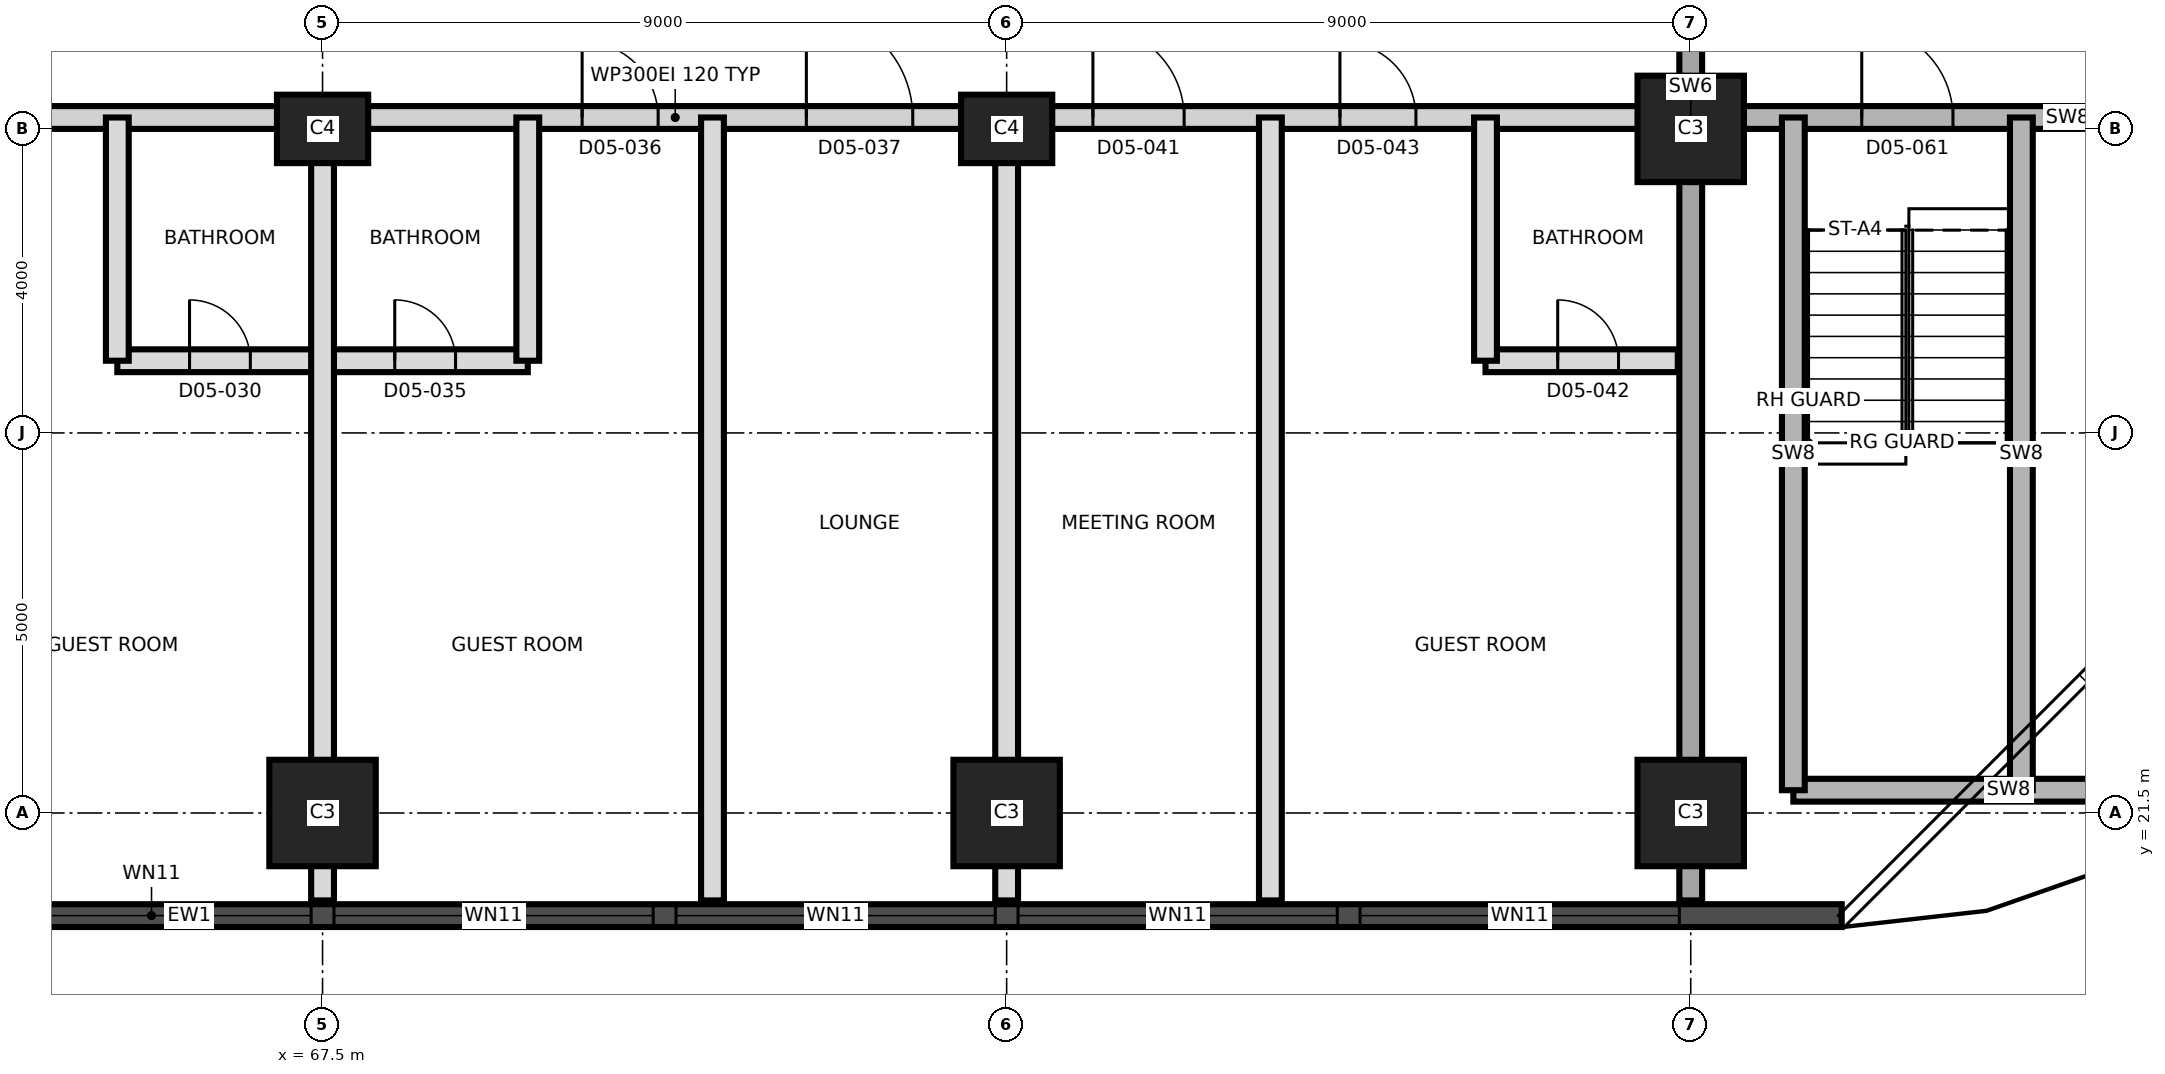
"""IFC4 building model, lengths in metres.
Left out: names, types, materials, properties, quantities, classifications, styles, units other than length and angle.
Written with IfcOpenShell. Run it as: python <this file> out.ifc"""

import sys

from ifc_helpers import new_model, si_unit, direction, frame, frame_2d, origin, origin_2d, place, context, subcontext, project, spatial, rectangle, extrude, element, fill, save


model = new_model("IFC4")
c1 = context("Model", 3, precision=1e-05, world=origin(), true_north=direction((0.0, 1.0)))
c2 = subcontext(c1, "Body", "Model", "MODEL_VIEW")
j1 = project(units=[si_unit("LENGTHUNIT", "METRE"), si_unit("PLANEANGLEUNIT", "RADIAN")], contexts=[c1])
p1 = place(None, origin())
s1 = spatial("IfcSite", under=j1, at=p1, CompositionType="ELEMENT")
p2 = place(p1, origin())
s2 = spatial("IfcBuilding", under=s1, at=p2, CompositionType="ELEMENT")
p3 = place(p2, frame((0.0, 0.0, 77.9)))
s3 = spatial("IfcBuildingStorey", under=s2, at=p3, CompositionType="ELEMENT", Elevation=77.9)
for number, where, z_axis, x_axis in (
    (1, (67.5, 21.5, 0.0), (0.0, 0.0, 1.0), (1.0, 0.0, 0.0)),
    (2, (76.5, 21.5, 0.0), (0.0, 0.0, 1.0), (1.0, 0.0, 0.0)),
    (3, (85.5, 21.5, 0.0), (0.0, 0.0, 1.0), (1.0, 0.0, 0.0)),
):
    element("IfcColumn", number, at=place(p3, frame(where, z_axis=z_axis, x_axis=x_axis)), inside=s3, PredefinedType="COLUMN", context=c2, shape_type="SweptSolid", body=[
        extrude(rectangle(XDim=1.4, YDim=1.4, at=origin_2d()), origin(), (0.0, 0.0, 1.0), 3.7),
    ])
for number, where, z_axis, x_axis in (
    (4, (67.5, 30.5, 0.0), (0.0, 0.0, 1.0), (1.0, 0.0, 0.0)),
    (5, (76.5, 30.5, 0.0), (0.0, 0.0, 1.0), (1.0, 0.0, 0.0)),
):
    element("IfcColumn", number, at=place(p3, frame(where, z_axis=z_axis, x_axis=x_axis)), inside=s3, PredefinedType="COLUMN", context=c2, shape_type="SweptSolid", body=[
        extrude(rectangle(XDim=1.2, YDim=0.9, at=origin_2d()), origin(), (0.0, 0.0, 1.0), 3.7),
    ])
p4 = place(p3, frame((85.5, 30.5, 0.0), z_axis=(0.0, 0.0, 1.0), x_axis=(1.0, 0.0, 0.0)))
e6 = element("IfcColumn", 6, at=p4, inside=s3, PredefinedType="COLUMN", context=c2, shape_type="SweptSolid", body=[
    extrude(rectangle(XDim=1.4, YDim=1.4, at=origin_2d()), origin(), (0.0, 0.0, 1.0), 3.7),
])
p5 = place(p3, frame((85.5, 20.35, 0.0), z_axis=(0.0, 0.0, 1.0), x_axis=(0.0, 1.0, 0.0)))
e7 = element("IfcWall", 7, at=p5, inside=s3, PredefinedType="SHEAR", context=c2, shape_type="SweptSolid", body=[
    extrude(rectangle(XDim=20.3, YDim=0.3, at=frame_2d((10.15, 0.0))), origin(), (0.0, 0.0, 1.0), 3.7),
])
p6 = place(p5, frame((11.35, 0.0, 0.0)))
e8 = element("IfcOpeningElement", 8, at=p6, cuts=e7, PredefinedType="OPENING", context=c2, shape_type="SweptSolid", body=[
    extrude(rectangle(XDim=1.4, YDim=2.1, at=frame_2d((0.7, 1.05))), frame((0.0, 0.16, 0.0), z_axis=(0.0, -1.0, 0.0), x_axis=(1.0, 0.0, 0.0)), (0.0, 0.0, 1.0), 0.32),
])
p7 = place(p3, frame((44.011, 20.15, 0.0), z_axis=(0.0, 0.0, 1.0), x_axis=(1.0, 0.0, 0.0)))
e9 = element("IfcWall", 9, at=p7, inside=s3, PredefinedType="SOLIDWALL", context=c2, shape_type="SweptSolid", body=[
    extrude(rectangle(XDim=43.476, YDim=0.3, at=frame_2d((21.738, 0.0))), origin(), (0.0, 0.0, 1.0), 3.4),
])
p8 = place(p7, frame((1.845, 0.0, 0.3)))
e10 = element("IfcOpeningElement", 10, at=p8, cuts=e9, PredefinedType="OPENING", context=c2, shape_type="SweptSolid", body=[
    extrude(rectangle(XDim=1.8, YDim=2.4, at=frame_2d((0.9, 1.2))), frame((0.0, 0.16, 0.0), z_axis=(0.0, -1.0, 0.0), x_axis=(1.0, 0.0, 0.0)), (0.0, 0.0, 1.0), 0.32),
])
p9 = place(p7, frame((5.639, 0.0, 0.9)))
e11 = element("IfcOpeningElement", 11, at=p9, cuts=e9, PredefinedType="OPENING", context=c2, shape_type="SweptSolid", body=[
    extrude(rectangle(XDim=4.2, YDim=1.5, at=frame_2d((2.1, 0.75))), frame((0.0, 0.16, 0.0), z_axis=(0.0, -1.0, 0.0), x_axis=(1.0, 0.0, 0.0)), (0.0, 0.0, 1.0), 0.32),
])
p10 = place(p7, frame((10.139, 0.0, 0.9)))
e12 = element("IfcOpeningElement", 12, at=p10, cuts=e9, PredefinedType="OPENING", context=c2, shape_type="SweptSolid", body=[
    extrude(rectangle(XDim=4.2, YDim=1.5, at=frame_2d((2.1, 0.75))), frame((0.0, 0.16, 0.0), z_axis=(0.0, -1.0, 0.0), x_axis=(1.0, 0.0, 0.0)), (0.0, 0.0, 1.0), 0.32),
])
p11 = place(p7, frame((14.639, 0.0, 0.9)))
e13 = element("IfcOpeningElement", 13, at=p11, cuts=e9, PredefinedType="OPENING", context=c2, shape_type="SweptSolid", body=[
    extrude(rectangle(XDim=4.2, YDim=1.5, at=frame_2d((2.1, 0.75))), frame((0.0, 0.16, 0.0), z_axis=(0.0, -1.0, 0.0), x_axis=(1.0, 0.0, 0.0)), (0.0, 0.0, 1.0), 0.32),
])
p12 = place(p7, frame((19.139, 0.0, 0.9)))
e14 = element("IfcOpeningElement", 14, at=p12, cuts=e9, PredefinedType="OPENING", context=c2, shape_type="SweptSolid", body=[
    extrude(rectangle(XDim=4.2, YDim=1.5, at=frame_2d((2.1, 0.75))), frame((0.0, 0.16, 0.0), z_axis=(0.0, -1.0, 0.0), x_axis=(1.0, 0.0, 0.0)), (0.0, 0.0, 1.0), 0.32),
])
p13 = place(p7, frame((23.639, 0.0, 0.9)))
e15 = element("IfcOpeningElement", 15, at=p13, cuts=e9, PredefinedType="OPENING", context=c2, shape_type="SweptSolid", body=[
    extrude(rectangle(XDim=4.2, YDim=1.5, at=frame_2d((2.1, 0.75))), frame((0.0, 0.16, 0.0), z_axis=(0.0, -1.0, 0.0), x_axis=(1.0, 0.0, 0.0)), (0.0, 0.0, 1.0), 0.32),
])
p14 = place(p7, frame((28.139, 0.0, 0.9)))
e16 = element("IfcOpeningElement", 16, at=p14, cuts=e9, PredefinedType="OPENING", context=c2, shape_type="SweptSolid", body=[
    extrude(rectangle(XDim=4.2, YDim=1.5, at=frame_2d((2.1, 0.75))), frame((0.0, 0.16, 0.0), z_axis=(0.0, -1.0, 0.0), x_axis=(1.0, 0.0, 0.0)), (0.0, 0.0, 1.0), 0.32),
])
p15 = place(p7, frame((32.639, 0.0, 0.9)))
e17 = element("IfcOpeningElement", 17, at=p15, cuts=e9, PredefinedType="OPENING", context=c2, shape_type="SweptSolid", body=[
    extrude(rectangle(XDim=4.2, YDim=1.5, at=frame_2d((2.1, 0.75))), frame((0.0, 0.16, 0.0), z_axis=(0.0, -1.0, 0.0), x_axis=(1.0, 0.0, 0.0)), (0.0, 0.0, 1.0), 0.32),
])
p16 = place(p7, frame((37.139, 0.0, 0.9)))
e18 = element("IfcOpeningElement", 18, at=p16, cuts=e9, PredefinedType="OPENING", context=c2, shape_type="SweptSolid", body=[
    extrude(rectangle(XDim=4.2, YDim=1.5, at=frame_2d((2.1, 0.75))), frame((0.0, 0.16, 0.0), z_axis=(0.0, -1.0, 0.0), x_axis=(1.0, 0.0, 0.0)), (0.0, 0.0, 1.0), 0.32),
])
p17 = place(p3, frame((86.85, 21.8, 0.0), z_axis=(0.0, 0.0, 1.0), x_axis=(1.0, 0.0, 0.0)))
e19 = element("IfcWall", 19, at=p17, inside=s3, PredefinedType="SHEAR", context=c2, shape_type="SweptSolid", body=[
    extrude(rectangle(XDim=5.665, YDim=0.3, at=frame_2d((2.833, 0.0))), origin(), (0.0, 0.0, 1.0), 3.4),
])
p18 = place(p3, frame((64.8, 27.45, 0.0), z_axis=(0.0, 0.0, 1.0), x_axis=(1.0, 0.0, 0.0)))
e20 = element("IfcWall", 20, at=p18, inside=s3, PredefinedType="PARTITIONING", context=c2, shape_type="SweptSolid", body=[
    extrude(rectangle(XDim=5.4, YDim=0.3, at=frame_2d((2.7, 0.0))), origin(), (0.0, 0.0, 1.0), 3.4),
])
p19 = place(p18, frame((0.95, 0.0, 0.0)))
e21 = element("IfcOpeningElement", 21, at=p19, cuts=e20, PredefinedType="OPENING", context=c2, shape_type="SweptSolid", body=[
    extrude(rectangle(XDim=0.8, YDim=2.1, at=frame_2d((0.4, 1.05))), frame((0.0, 0.16, 0.0), z_axis=(0.0, -1.0, 0.0), x_axis=(1.0, 0.0, 0.0)), (0.0, 0.0, 1.0), 0.32),
])
p20 = place(p18, frame((3.65, 0.0, 0.0)))
e22 = element("IfcOpeningElement", 22, at=p20, cuts=e20, PredefinedType="OPENING", context=c2, shape_type="SweptSolid", body=[
    extrude(rectangle(XDim=0.8, YDim=2.1, at=frame_2d((0.4, 1.05))), frame((0.0, 0.16, 0.0), z_axis=(0.0, -1.0, 0.0), x_axis=(1.0, 0.0, 0.0)), (0.0, 0.0, 1.0), 0.32),
])
p21 = place(p3, frame((82.8, 27.45, 0.0), z_axis=(0.0, 0.0, 1.0), x_axis=(1.0, 0.0, 0.0)))
e23 = element("IfcWall", 23, at=p21, inside=s3, PredefinedType="PARTITIONING", context=c2, shape_type="SweptSolid", body=[
    extrude(rectangle(XDim=2.53, YDim=0.3, at=frame_2d((1.265, 0.0))), origin(), (0.0, 0.0, 1.0), 3.4),
])
p22 = place(p21, frame((0.95, 0.0, 0.0)))
e24 = element("IfcOpeningElement", 24, at=p22, cuts=e23, PredefinedType="OPENING", context=c2, shape_type="SweptSolid", body=[
    extrude(rectangle(XDim=0.8, YDim=2.1, at=frame_2d((0.4, 1.05))), frame((0.0, 0.16, 0.0), z_axis=(0.0, -1.0, 0.0), x_axis=(1.0, 0.0, 0.0)), (0.0, 0.0, 1.0), 0.32),
])
p23 = place(p3, frame((58.95, 30.65, 0.0), z_axis=(0.0, 0.0, 1.0), x_axis=(1.0, 0.0, 0.0)))
e25 = element("IfcWall", 25, at=p23, inside=s3, PredefinedType="PARTITIONING", context=c2, shape_type="SweptSolid", body=[
    extrude(rectangle(XDim=26.38, YDim=0.3, at=frame_2d((13.19, 0.0))), origin(), (0.0, 0.0, 1.0), 3.4),
])
p24 = place(p23, frame((0.685, 0.0, 0.0)))
e26 = element("IfcOpeningElement", 26, at=p24, cuts=e25, PredefinedType="OPENING", context=c2, shape_type="SweptSolid", body=[
    extrude(rectangle(XDim=1.2, YDim=2.1, at=frame_2d((0.6, 1.05))), frame((0.0, 0.16, 0.0), z_axis=(0.0, -1.0, 0.0), x_axis=(1.0, 0.0, 0.0)), (0.0, 0.0, 1.0), 0.32),
])
p25 = place(p23, frame((3.935, 0.0, 0.0)))
e27 = element("IfcOpeningElement", 27, at=p25, cuts=e25, PredefinedType="OPENING", context=c2, shape_type="SweptSolid", body=[
    extrude(rectangle(XDim=1.0, YDim=2.1, at=frame_2d((0.5, 1.05))), frame((0.0, 0.16, 0.0), z_axis=(0.0, -1.0, 0.0), x_axis=(1.0, 0.0, 0.0)), (0.0, 0.0, 1.0), 0.32),
])
p26 = place(p23, frame((11.965, 0.0, 0.0)))
e28 = element("IfcOpeningElement", 28, at=p26, cuts=e25, PredefinedType="OPENING", context=c2, shape_type="SweptSolid", body=[
    extrude(rectangle(XDim=1.0, YDim=2.1, at=frame_2d((0.5, 1.05))), frame((0.0, 0.16, 0.0), z_axis=(0.0, -1.0, 0.0), x_axis=(1.0, 0.0, 0.0)), (0.0, 0.0, 1.0), 0.32),
])
p27 = place(p23, frame((14.915, 0.0, 0.0)))
e29 = element("IfcOpeningElement", 29, at=p27, cuts=e25, PredefinedType="OPENING", context=c2, shape_type="SweptSolid", body=[
    extrude(rectangle(XDim=1.4, YDim=2.1, at=frame_2d((0.7, 1.05))), frame((0.0, 0.16, 0.0), z_axis=(0.0, -1.0, 0.0), x_axis=(1.0, 0.0, 0.0)), (0.0, 0.0, 1.0), 0.32),
])
p28 = place(p23, frame((18.685, 0.0, 0.0)))
e30 = element("IfcOpeningElement", 30, at=p28, cuts=e25, PredefinedType="OPENING", context=c2, shape_type="SweptSolid", body=[
    extrude(rectangle(XDim=1.2, YDim=2.1, at=frame_2d((0.6, 1.05))), frame((0.0, 0.16, 0.0), z_axis=(0.0, -1.0, 0.0), x_axis=(1.0, 0.0, 0.0)), (0.0, 0.0, 1.0), 0.32),
])
p29 = place(p23, frame((21.935, 0.0, 0.0)))
e31 = element("IfcOpeningElement", 31, at=p29, cuts=e25, PredefinedType="OPENING", context=c2, shape_type="SweptSolid", body=[
    extrude(rectangle(XDim=1.0, YDim=2.1, at=frame_2d((0.5, 1.05))), frame((0.0, 0.16, 0.0), z_axis=(0.0, -1.0, 0.0), x_axis=(1.0, 0.0, 0.0)), (0.0, 0.0, 1.0), 0.32),
])
p30 = place(p3, frame((85.67, 30.65, 0.0), z_axis=(0.0, 0.0, 1.0), x_axis=(1.0, 0.0, 0.0)))
e32 = element("IfcWall", 32, at=p30, inside=s3, PredefinedType="SHEAR", context=c2, shape_type="SweptSolid", body=[
    extrude(rectangle(XDim=9.58, YDim=0.3, at=frame_2d((4.79, 0.0))), origin(), (0.0, 0.0, 1.0), 3.4),
])
p31 = place(p30, frame((2.08, 0.0, 0.0)))
e33 = element("IfcOpeningElement", 33, at=p31, cuts=e32, PredefinedType="OPENING", context=c2, shape_type="SweptSolid", body=[
    extrude(rectangle(XDim=1.2, YDim=2.1, at=frame_2d((0.6, 1.05))), frame((0.0, 0.16, 0.0), z_axis=(0.0, -1.0, 0.0), x_axis=(1.0, 0.0, 0.0)), (0.0, 0.0, 1.0), 0.32),
])
p32 = place(p30, frame((5.63, 0.0, 0.0)))
e34 = element("IfcOpeningElement", 34, at=p32, cuts=e32, PredefinedType="OPENING", context=c2, shape_type="SweptSolid", body=[
    extrude(rectangle(XDim=1.0, YDim=2.1, at=frame_2d((0.5, 1.05))), frame((0.0, 0.16, 0.0), z_axis=(0.0, -1.0, 0.0), x_axis=(1.0, 0.0, 0.0)), (0.0, 0.0, 1.0), 0.32),
])
p33 = place(p3, frame((64.8, 27.45, 0.0), z_axis=(0.0, 0.0, 1.0), x_axis=(0.0, 1.0, 0.0)))
e35 = element("IfcWall", 35, at=p33, inside=s3, PredefinedType="PARTITIONING", context=c2, shape_type="SweptSolid", body=[
    extrude(rectangle(XDim=3.2, YDim=0.3, at=frame_2d((1.6, 0.0))), origin(), (0.0, 0.0, 1.0), 3.4),
])
p34 = place(p3, frame((67.5, 20.35, 0.0), z_axis=(0.0, 0.0, 1.0), x_axis=(0.0, 1.0, 0.0)))
e36 = element("IfcWall", 36, at=p34, inside=s3, PredefinedType="PARTITIONING", context=c2, shape_type="SweptSolid", body=[
    extrude(rectangle(XDim=10.3, YDim=0.3, at=frame_2d((5.15, 0.0))), origin(), (0.0, 0.0, 1.0), 3.4),
])
p35 = place(p3, frame((70.2, 27.45, 0.0), z_axis=(0.0, 0.0, 1.0), x_axis=(0.0, 1.0, 0.0)))
e37 = element("IfcWall", 37, at=p35, inside=s3, PredefinedType="PARTITIONING", context=c2, shape_type="SweptSolid", body=[
    extrude(rectangle(XDim=3.2, YDim=0.3, at=frame_2d((1.6, 0.0))), origin(), (0.0, 0.0, 1.0), 3.4),
])
for number, where, z_axis, x_axis in (
    (38, (72.63, 20.35, 0.0), (0.0, 0.0, 1.0), (0.0, 1.0, 0.0)),
    (39, (76.5, 20.35, 0.0), (0.0, 0.0, 1.0), (0.0, 1.0, 0.0)),
    (40, (79.97, 20.35, 0.0), (0.0, 0.0, 1.0), (0.0, 1.0, 0.0)),
):
    element("IfcWall", number, at=place(p3, frame(where, z_axis=z_axis, x_axis=x_axis)), inside=s3, PredefinedType="PARTITIONING", context=c2, shape_type="SweptSolid", body=[
        extrude(rectangle(XDim=10.3, YDim=0.3, at=frame_2d((5.15, 0.0))), origin(), (0.0, 0.0, 1.0), 3.4),
    ])
p36 = place(p3, frame((82.8, 27.45, 0.0), z_axis=(0.0, 0.0, 1.0), x_axis=(0.0, 1.0, 0.0)))
e41 = element("IfcWall", 41, at=p36, inside=s3, PredefinedType="PARTITIONING", context=c2, shape_type="SweptSolid", body=[
    extrude(rectangle(XDim=3.2, YDim=0.3, at=frame_2d((1.6, 0.0))), origin(), (0.0, 0.0, 1.0), 3.4),
])
for number, where, z_axis, x_axis in (
    (42, (86.85, 21.8, 0.0), (0.0, 0.0, 1.0), (0.0, 1.0, 0.0)),
    (43, (89.85, 21.8, 0.0), (0.0, 0.0, 1.0), (0.0, 1.0, 0.0)),
):
    element("IfcWall", number, at=place(p3, frame(where, z_axis=z_axis, x_axis=x_axis)), inside=s3, PredefinedType="SHEAR", context=c2, shape_type="SweptSolid", body=[
        extrude(rectangle(XDim=8.85, YDim=0.3, at=frame_2d((4.425, 0.0))), origin(), (0.0, 0.0, 1.0), 3.4),
    ])
p37 = place(p12, origin())
e44 = element("IfcWindow", 44, at=p37, inside=s3, PartitioningType="SINGLE_PANEL", PredefinedType="WINDOW", context=c2, shape_type="SweptSolid", body=[
    extrude(rectangle(XDim=4.2, YDim=1.5, at=frame_2d((2.1, 0.75))), frame((0.0, 0.03, 0.0), z_axis=(0.0, -1.0, 0.0), x_axis=(1.0, 0.0, 0.0)), (0.0, 0.0, 1.0), 0.06),
])
fill(e14, e44)
p38 = place(p13, origin())
e45 = element("IfcWindow", 45, at=p38, inside=s3, PartitioningType="SINGLE_PANEL", PredefinedType="WINDOW", context=c2, shape_type="SweptSolid", body=[
    extrude(rectangle(XDim=4.2, YDim=1.5, at=frame_2d((2.1, 0.75))), frame((0.0, 0.03, 0.0), z_axis=(0.0, -1.0, 0.0), x_axis=(1.0, 0.0, 0.0)), (0.0, 0.0, 1.0), 0.06),
])
fill(e15, e45)
p39 = place(p14, origin())
e46 = element("IfcWindow", 46, at=p39, inside=s3, PartitioningType="SINGLE_PANEL", PredefinedType="WINDOW", context=c2, shape_type="SweptSolid", body=[
    extrude(rectangle(XDim=4.2, YDim=1.5, at=frame_2d((2.1, 0.75))), frame((0.0, 0.03, 0.0), z_axis=(0.0, -1.0, 0.0), x_axis=(1.0, 0.0, 0.0)), (0.0, 0.0, 1.0), 0.06),
])
fill(e16, e46)
p40 = place(p15, origin())
e47 = element("IfcWindow", 47, at=p40, inside=s3, PartitioningType="SINGLE_PANEL", PredefinedType="WINDOW", context=c2, shape_type="SweptSolid", body=[
    extrude(rectangle(XDim=4.2, YDim=1.5, at=frame_2d((2.1, 0.75))), frame((0.0, 0.03, 0.0), z_axis=(0.0, -1.0, 0.0), x_axis=(1.0, 0.0, 0.0)), (0.0, 0.0, 1.0), 0.06),
])
fill(e17, e47)
p41 = place(p16, origin())
e48 = element("IfcWindow", 48, at=p41, inside=s3, PartitioningType="SINGLE_PANEL", PredefinedType="WINDOW", context=c2, shape_type="SweptSolid", body=[
    extrude(rectangle(XDim=4.2, YDim=1.5, at=frame_2d((2.1, 0.75))), frame((0.0, 0.03, 0.0), z_axis=(0.0, -1.0, 0.0), x_axis=(1.0, 0.0, 0.0)), (0.0, 0.0, 1.0), 0.06),
])
fill(e18, e48)
p42 = place(p19, origin())
e49 = element("IfcDoor", 49, at=p42, inside=s3, OperationType="SINGLE_SWING_RIGHT", PredefinedType="DOOR", context=c2, shape_type="SweptSolid", body=[
    extrude(rectangle(XDim=0.8, YDim=2.1, at=frame_2d((0.4, 1.05))), frame((0.0, 0.025, 0.0), z_axis=(0.0, -1.0, 0.0), x_axis=(1.0, 0.0, 0.0)), (0.0, 0.0, 1.0), 0.05),
])
fill(e21, e49)
p43 = place(p20, origin())
e50 = element("IfcDoor", 50, at=p43, inside=s3, OperationType="SINGLE_SWING_LEFT", PredefinedType="DOOR", context=c2, shape_type="SweptSolid", body=[
    extrude(rectangle(XDim=0.8, YDim=2.1, at=frame_2d((0.4, 1.05))), frame((0.0, 0.025, 0.0), z_axis=(0.0, -1.0, 0.0), x_axis=(1.0, 0.0, 0.0)), (0.0, 0.0, 1.0), 0.05),
])
fill(e22, e50)
p44 = place(p26, origin())
e51 = element("IfcDoor", 51, at=p44, inside=s3, OperationType="SINGLE_SWING_LEFT", PredefinedType="DOOR", context=c2, shape_type="SweptSolid", body=[
    extrude(rectangle(XDim=1.0, YDim=2.1, at=frame_2d((0.5, 1.05))), frame((0.0, 0.025, 0.0), z_axis=(0.0, -1.0, 0.0), x_axis=(1.0, 0.0, 0.0)), (0.0, 0.0, 1.0), 0.05),
])
fill(e28, e51)
p45 = place(p27, origin())
e52 = element("IfcDoor", 52, at=p45, inside=s3, OperationType="SINGLE_SWING_RIGHT", PredefinedType="DOOR", context=c2, shape_type="SweptSolid", body=[
    extrude(rectangle(XDim=1.4, YDim=2.1, at=frame_2d((0.7, 1.05))), frame((0.0, 0.025, 0.0), z_axis=(0.0, -1.0, 0.0), x_axis=(1.0, 0.0, 0.0)), (0.0, 0.0, 1.0), 0.05),
])
fill(e29, e52)
p46 = place(p28, origin())
e53 = element("IfcDoor", 53, at=p46, inside=s3, OperationType="SINGLE_SWING_LEFT", PredefinedType="DOOR", context=c2, shape_type="SweptSolid", body=[
    extrude(rectangle(XDim=1.2, YDim=2.1, at=frame_2d((0.6, 1.05))), frame((0.0, 0.025, 0.0), z_axis=(0.0, -1.0, 0.0), x_axis=(1.0, 0.0, 0.0)), (0.0, 0.0, 1.0), 0.05),
])
fill(e30, e53)
p47 = place(p22, origin())
e54 = element("IfcDoor", 54, at=p47, inside=s3, OperationType="SINGLE_SWING_RIGHT", PredefinedType="DOOR", context=c2, shape_type="SweptSolid", body=[
    extrude(rectangle(XDim=0.8, YDim=2.1, at=frame_2d((0.4, 1.05))), frame((0.0, 0.025, 0.0), z_axis=(0.0, -1.0, 0.0), x_axis=(1.0, 0.0, 0.0)), (0.0, 0.0, 1.0), 0.05),
])
fill(e24, e54)
p48 = place(p29, origin())
e55 = element("IfcDoor", 55, at=p48, inside=s3, OperationType="SINGLE_SWING_LEFT", PredefinedType="DOOR", context=c2, shape_type="SweptSolid", body=[
    extrude(rectangle(XDim=1.0, YDim=2.1, at=frame_2d((0.5, 1.05))), frame((0.0, 0.025, 0.0), z_axis=(0.0, -1.0, 0.0), x_axis=(1.0, 0.0, 0.0)), (0.0, 0.0, 1.0), 0.05),
])
fill(e31, e55)
p49 = place(p31, origin())
e56 = element("IfcDoor", 56, at=p49, inside=s3, OperationType="SINGLE_SWING_LEFT", PredefinedType="DOOR", context=c2, shape_type="SweptSolid", body=[
    extrude(rectangle(XDim=1.2, YDim=2.1, at=frame_2d((0.6, 1.05))), frame((0.0, 0.025, 0.0), z_axis=(0.0, -1.0, 0.0), x_axis=(1.0, 0.0, 0.0)), (0.0, 0.0, 1.0), 0.05),
])
fill(e33, e56)
save(model, sys.argv[1])
